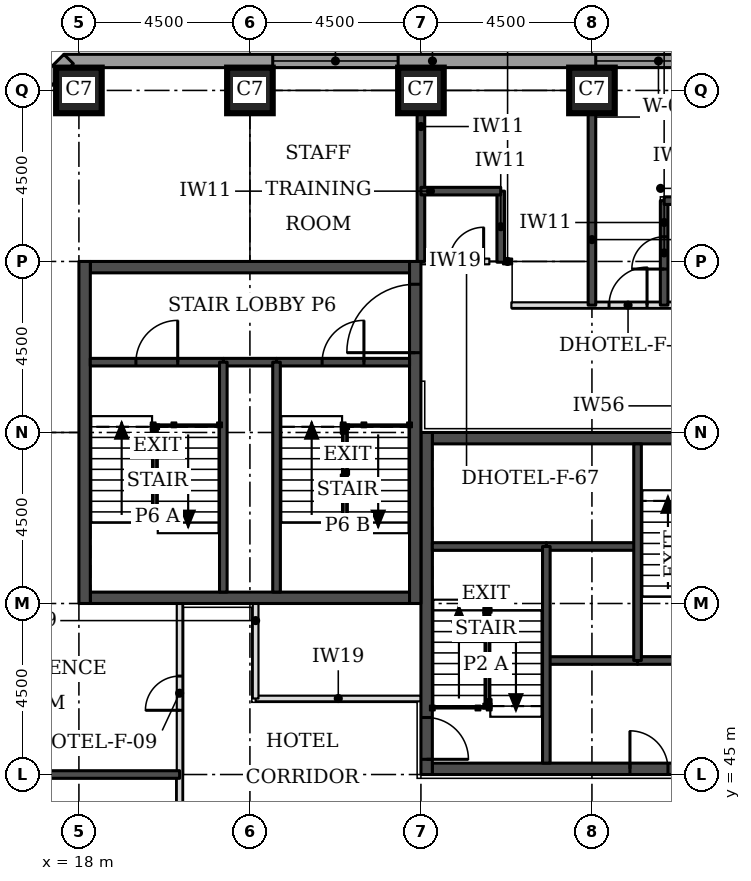
"""IFC4 building model, lengths in metres.
Left out: names, types, materials, properties, quantities, classifications, styles, units other than length and angle.
Written with IfcOpenShell. Run it as: python <this file> out.ifc"""

import sys

from ifc_helpers import new_model, si_unit, direction, frame, frame_2d, origin, origin_2d, place, context, subcontext, project, spatial, rectangle, extrude, element, fill, save


model = new_model("IFC4")
c1 = context("Model", 3, precision=1e-05, world=origin(), true_north=direction((0.0, 1.0)))
c2 = subcontext(c1, "Body", "Model", "MODEL_VIEW")
j1 = project(units=[si_unit("LENGTHUNIT", "METRE"), si_unit("PLANEANGLEUNIT", "RADIAN")], contexts=[c1])
p1 = place(None, origin())
s1 = spatial("IfcSite", under=j1, at=p1, CompositionType="ELEMENT")
p2 = place(p1, origin())
s2 = spatial("IfcBuilding", under=s1, at=p2, CompositionType="ELEMENT")
p3 = place(p2, frame((0.0, 0.0, 42.9)))
s3 = spatial("IfcBuildingStorey", under=s2, at=p3, CompositionType="ELEMENT", Elevation=42.9)
for number, where, z_axis, x_axis in (
    (1, (18.0, 63.0, 0.0), (0.0, 0.0, 1.0), (1.0, 0.0, 0.0)),
    (2, (22.5, 63.0, 0.0), (0.0, 0.0, 1.0), (1.0, 0.0, 0.0)),
    (3, (27.0, 63.0, 0.0), (0.0, 0.0, 1.0), (1.0, 0.0, 0.0)),
    (4, (31.5, 63.0, 0.0), (0.0, 0.0, 1.0), (1.0, 0.0, 0.0)),
):
    element("IfcColumn", number, at=place(p3, frame(where, z_axis=z_axis, x_axis=x_axis)), inside=s3, PredefinedType="COLUMN", context=c2, shape_type="SweptSolid", body=[
        extrude(rectangle(XDim=1.2, YDim=1.2, at=origin_2d()), origin(), (0.0, 0.0, 1.0), 3.3),
    ])
p4 = place(p3, frame((27.3, 45.15, 0.0), z_axis=(0.0, 0.0, 1.0), x_axis=(1.0, 0.0, 0.0)))
e5 = element("IfcWall", 5, at=p4, inside=s3, PredefinedType="SHEAR", context=c2, shape_type="SweptSolid", body=[
    extrude(rectangle(XDim=8.4, YDim=0.3, at=frame_2d((4.2, 0.0))), origin(), (0.0, 0.0, 1.0), 3.3),
])
p5 = place(p4, frame((5.2, 0.0, 0.0)))
e6 = element("IfcOpeningElement", 6, at=p5, cuts=e5, PredefinedType="OPENING", context=c2, shape_type="SweptSolid", body=[
    extrude(rectangle(XDim=1.0, YDim=2.1, at=frame_2d((0.5, 1.05))), frame((0.0, 0.16, 0.0), z_axis=(0.0, -1.0, 0.0), x_axis=(1.0, 0.0, 0.0)), (0.0, 0.0, 1.0), 0.32),
])
p6 = place(p3, frame((27.3, 53.85, 0.0), z_axis=(0.0, 0.0, 1.0), x_axis=(1.0, 0.0, 0.0)))
e7 = element("IfcWall", 7, at=p6, inside=s3, PredefinedType="SHEAR", context=c2, shape_type="SweptSolid", body=[
    extrude(rectangle(XDim=8.4, YDim=0.3, at=frame_2d((4.2, 0.0))), origin(), (0.0, 0.0, 1.0), 3.3),
])
p7 = place(p6, frame((6.4, 0.0, 0.0)))
e8 = element("IfcOpeningElement", 8, at=p7, cuts=e7, PredefinedType="OPENING", context=c2, shape_type="SweptSolid", body=[
    extrude(rectangle(XDim=1.1, YDim=2.1, at=frame_2d((0.55, 1.05))), frame((0.0, 0.16, 0.0), z_axis=(0.0, -1.0, 0.0), x_axis=(1.0, 0.0, 0.0)), (0.0, 0.0, 1.0), 0.32),
])
p8 = place(p3, frame((27.15, 45.0, 0.0), z_axis=(0.0, 0.0, 1.0), x_axis=(0.0, 1.0, 0.0)))
e9 = element("IfcWall", 9, at=p8, inside=s3, PredefinedType="SHEAR", context=c2, shape_type="SweptSolid", body=[
    extrude(rectangle(XDim=9.0, YDim=0.3, at=frame_2d((4.5, 0.0))), origin(), (0.0, 0.0, 1.0), 3.3),
])
p9 = place(p8, frame((0.4, 0.0, 0.0)))
e10 = element("IfcOpeningElement", 10, at=p9, cuts=e9, PredefinedType="OPENING", context=c2, shape_type="SweptSolid", body=[
    extrude(rectangle(XDim=1.1, YDim=2.1, at=frame_2d((0.55, 1.05))), frame((0.0, 0.16, 0.0), z_axis=(0.0, -1.0, 0.0), x_axis=(1.0, 0.0, 0.0)), (0.0, 0.0, 1.0), 0.32),
])
for number, where, z_axis, x_axis in (
    (11, (18.3, 49.65, 0.0), (0.0, 0.0, 1.0), (1.0, 0.0, 0.0)),
    (12, (18.3, 58.35, 0.0), (0.0, 0.0, 1.0), (1.0, 0.0, 0.0)),
):
    element("IfcWall", number, at=place(p3, frame(where, z_axis=z_axis, x_axis=x_axis)), inside=s3, PredefinedType="SHEAR", context=c2, shape_type="SweptSolid", body=[
        extrude(rectangle(XDim=8.4, YDim=0.3, at=frame_2d((4.2, 0.0))), origin(), (0.0, 0.0, 1.0), 3.3),
    ])
p10 = place(p3, frame((18.15, 49.5, 0.0), z_axis=(0.0, 0.0, 1.0), x_axis=(0.0, 1.0, 0.0)))
e13 = element("IfcWall", 13, at=p10, inside=s3, PredefinedType="SHEAR", context=c2, shape_type="SweptSolid", body=[
    extrude(rectangle(XDim=9.0, YDim=0.3, at=frame_2d((4.5, 0.0))), origin(), (0.0, 0.0, 1.0), 3.3),
])
p11 = place(p3, frame((26.85, 49.5, 0.0), z_axis=(0.0, 0.0, 1.0), x_axis=(0.0, 1.0, 0.0)))
e14 = element("IfcWall", 14, at=p11, inside=s3, PredefinedType="SHEAR", context=c2, shape_type="SweptSolid", body=[
    extrude(rectangle(XDim=9.0, YDim=0.3, at=frame_2d((4.5, 0.0))), origin(), (0.0, 0.0, 1.0), 3.3),
])
p12 = place(p11, frame((6.6, 0.0, 0.0)))
e15 = element("IfcOpeningElement", 15, at=p12, cuts=e14, PredefinedType="OPENING", context=c2, shape_type="SweptSolid", body=[
    extrude(rectangle(XDim=1.8, YDim=2.1, at=frame_2d((0.9, 1.05))), frame((0.0, 0.16, 0.0), z_axis=(0.0, -1.0, 0.0), x_axis=(1.0, 0.0, 0.0)), (0.0, 0.0, 1.0), 0.32),
])
p13 = place(p3, frame((35.4, 63.775, 0.0), z_axis=(0.0, 0.0, 1.0), x_axis=(-1.0, 0.0, 0.0)))
e16 = element("IfcWall", 16, at=p13, inside=s3, PredefinedType="STANDARD", context=c2, shape_type="SweptSolid", body=[
    extrude(rectangle(XDim=17.793, YDim=0.35, at=frame_2d((8.897, 0.0))), origin(), (0.0, 0.0, 1.0), 3.055),
])
p14 = place(p13, frame((0.5, 0.0, 0.8)))
e17 = element("IfcOpeningElement", 17, at=p14, cuts=e16, PredefinedType="OPENING", context=c2, shape_type="SweptSolid", body=[
    extrude(rectangle(XDim=3.3, YDim=1.5, at=frame_2d((1.65, 0.75))), frame((0.0, 0.185, 0.0), z_axis=(0.0, -1.0, 0.0), x_axis=(1.0, 0.0, 0.0)), (0.0, 0.0, 1.0), 0.37),
])
p15 = place(p13, frame((9.0, 0.0, 0.8)))
e18 = element("IfcOpeningElement", 18, at=p15, cuts=e16, PredefinedType="OPENING", context=c2, shape_type="SweptSolid", body=[
    extrude(rectangle(XDim=3.3, YDim=1.5, at=frame_2d((1.65, 0.75))), frame((0.0, 0.185, 0.0), z_axis=(0.0, -1.0, 0.0), x_axis=(1.0, 0.0, 0.0)), (0.0, 0.0, 1.0), 0.37),
])
p16 = place(p3, frame((17.73, 63.826, 0.0), z_axis=(0.0, 0.0, 1.0), x_axis=(-0.707106781187, -0.707106781187, 0.0)))
e19 = element("IfcWall", 19, at=p16, inside=s3, PredefinedType="STANDARD", context=c2, shape_type="SweptSolid", body=[
    extrude(rectangle(XDim=7.151, YDim=0.35, at=frame_2d((3.576, 0.0))), origin(), (0.0, 0.0, 1.0), 3.055),
])
p17 = place(p16, frame((1.926, 0.0, 0.8)))
e20 = element("IfcOpeningElement", 20, at=p17, cuts=e19, PredefinedType="OPENING", context=c2, shape_type="SweptSolid", body=[
    extrude(rectangle(XDim=3.3, YDim=1.5, at=frame_2d((1.65, 0.75))), frame((0.0, 0.185, 0.0), z_axis=(0.0, -1.0, 0.0), x_axis=(1.0, 0.0, 0.0)), (0.0, 0.0, 1.0), 0.37),
])
p18 = place(p3, frame((20.65, 23.65, 0.0), z_axis=(0.0, 0.0, 1.0), x_axis=(0.0, 1.0, 0.0)))
e21 = element("IfcWall", 21, at=p18, inside=s3, PredefinedType="PARTITIONING", context=c2, shape_type="SweptSolid", body=[
    extrude(rectangle(XDim=25.85, YDim=0.15, at=frame_2d((12.925, 0.0))), origin(), (0.0, 0.0, 1.0), 3.08),
])
p19 = place(p18, frame((1.9, 0.0, 0.0)))
e22 = element("IfcOpeningElement", 22, at=p19, cuts=e21, PredefinedType="OPENING", context=c2, shape_type="SweptSolid", body=[
    extrude(rectangle(XDim=1.0, YDim=2.1, at=frame_2d((0.5, 1.05))), frame((0.0, 0.085, 0.0), z_axis=(0.0, -1.0, 0.0), x_axis=(1.0, 0.0, 0.0)), (0.0, 0.0, 1.0), 0.17),
])
p20 = place(p18, frame((6.0, 0.0, 0.0)))
e23 = element("IfcOpeningElement", 23, at=p20, cuts=e21, PredefinedType="OPENING", context=c2, shape_type="SweptSolid", body=[
    extrude(rectangle(XDim=1.0, YDim=2.1, at=frame_2d((0.5, 1.05))), frame((0.0, 0.085, 0.0), z_axis=(0.0, -1.0, 0.0), x_axis=(1.0, 0.0, 0.0)), (0.0, 0.0, 1.0), 0.17),
])
p21 = place(p18, frame((17.95, 0.0, 0.0)))
e24 = element("IfcOpeningElement", 24, at=p21, cuts=e21, PredefinedType="OPENING", context=c2, shape_type="SweptSolid", body=[
    extrude(rectangle(XDim=1.0, YDim=2.1, at=frame_2d((0.5, 1.05))), frame((0.0, 0.085, 0.0), z_axis=(0.0, -1.0, 0.0), x_axis=(1.0, 0.0, 0.0)), (0.0, 0.0, 1.0), 0.17),
])
p22 = place(p18, frame((23.04, 0.0, 0.0)))
e25 = element("IfcOpeningElement", 25, at=p22, cuts=e21, PredefinedType="OPENING", context=c2, shape_type="SweptSolid", body=[
    extrude(rectangle(XDim=0.9, YDim=2.1, at=frame_2d((0.45, 1.05))), frame((0.0, 0.085, 0.0), z_axis=(0.0, -1.0, 0.0), x_axis=(1.0, 0.0, 0.0)), (0.0, 0.0, 1.0), 0.17),
])
p23 = place(p3, frame((22.65, 47.0, 0.0), z_axis=(0.0, 0.0, 1.0), x_axis=(1.0, 0.0, 0.0)))
e26 = element("IfcWall", 26, at=p23, inside=s3, PredefinedType="PARTITIONING", context=c2, shape_type="SweptSolid", body=[
    extrude(rectangle(XDim=4.35, YDim=0.15, at=frame_2d((2.175, 0.0))), origin(), (0.0, 0.0, 1.0), 3.08),
])
p24 = place(p3, frame((22.65, 47.0, 0.0), z_axis=(0.0, 0.0, 1.0), x_axis=(0.0, 1.0, 0.0)))
e27 = element("IfcWall", 27, at=p24, inside=s3, PredefinedType="PARTITIONING", context=c2, shape_type="SweptSolid", body=[
    extrude(rectangle(XDim=2.5, YDim=0.15, at=frame_2d((1.25, 0.0))), origin(), (0.0, 0.0, 1.0), 3.08),
])
p25 = place(p3, frame((29.38, 57.35, 0.0), z_axis=(0.0, 0.0, 1.0), x_axis=(1.0, 0.0, 0.0)))
e28 = element("IfcWall", 28, at=p25, inside=s3, PredefinedType="PARTITIONING", context=c2, shape_type="SweptSolid", body=[
    extrude(rectangle(XDim=13.62, YDim=0.15, at=frame_2d((6.81, 0.0))), origin(), (0.0, 0.0, 1.0), 3.08),
])
p26 = place(p25, frame((2.57, 0.0, 0.0)))
e29 = element("IfcOpeningElement", 29, at=p26, cuts=e28, PredefinedType="OPENING", context=c2, shape_type="SweptSolid", body=[
    extrude(rectangle(XDim=1.0, YDim=2.1, at=frame_2d((0.5, 1.05))), frame((0.0, 0.085, 0.0), z_axis=(0.0, -1.0, 0.0), x_axis=(1.0, 0.0, 0.0)), (0.0, 0.0, 1.0), 0.17),
])
p27 = place(p25, frame((8.42, 0.0, 0.0)))
e30 = element("IfcOpeningElement", 30, at=p27, cuts=e28, PredefinedType="OPENING", context=c2, shape_type="SweptSolid", body=[
    extrude(rectangle(XDim=0.9, YDim=2.1, at=frame_2d((0.45, 1.05))), frame((0.0, 0.085, 0.0), z_axis=(0.0, -1.0, 0.0), x_axis=(1.0, 0.0, 0.0)), (0.0, 0.0, 1.0), 0.17),
])
p28 = place(p3, frame((14.1, 45.0, 0.0), z_axis=(0.0, 0.0, 1.0), x_axis=(1.0, 0.0, 0.0)))
e31 = element("IfcWall", 31, at=p28, inside=s3, PredefinedType="SOLIDWALL", context=c2, shape_type="SweptSolid", body=[
    extrude(rectangle(XDim=6.55, YDim=0.2, at=frame_2d((3.275, 0.0))), origin(), (0.0, 0.0, 1.0), 3.08),
])
p29 = place(p3, frame((27.0, 58.5, 0.0), z_axis=(0.0, 0.0, 1.0), x_axis=(0.0, 1.0, 0.0)))
e32 = element("IfcWall", 32, at=p29, inside=s3, PredefinedType="SOLIDWALL", context=c2, shape_type="SweptSolid", body=[
    extrude(rectangle(XDim=3.9, YDim=0.2, at=frame_2d((1.95, 0.0))), origin(), (0.0, 0.0, 1.0), 3.08),
])
p30 = place(p3, frame((29.1, 58.48, 0.0), z_axis=(0.0, 0.0, 1.0), x_axis=(0.0, 1.0, 0.0)))
e33 = element("IfcWall", 33, at=p30, inside=s3, PredefinedType="SOLIDWALL", context=c2, shape_type="SweptSolid", body=[
    extrude(rectangle(XDim=1.87, YDim=0.2, at=frame_2d((0.935, 0.0))), origin(), (0.0, 0.0, 1.0), 3.08),
])
p31 = place(p3, frame((31.5, 57.35, 0.0), z_axis=(0.0, 0.0, 1.0), x_axis=(0.0, 1.0, 0.0)))
e34 = element("IfcWall", 34, at=p31, inside=s3, PredefinedType="SOLIDWALL", context=c2, shape_type="SweptSolid", body=[
    extrude(rectangle(XDim=5.05, YDim=0.2, at=frame_2d((2.525, 0.0))), origin(), (0.0, 0.0, 1.0), 3.08),
])
p32 = place(p3, frame((33.4, 57.35, 0.0), z_axis=(0.0, 0.0, 1.0), x_axis=(0.0, 1.0, 0.0)))
e35 = element("IfcWall", 35, at=p32, inside=s3, PredefinedType="SOLIDWALL", context=c2, shape_type="SweptSolid", body=[
    extrude(rectangle(XDim=2.75, YDim=0.2, at=frame_2d((1.375, 0.0))), origin(), (0.0, 0.0, 1.0), 3.08),
])
p33 = place(p32, frame((0.95, 0.0, 0.0)))
e36 = element("IfcOpeningElement", 36, at=p33, cuts=e35, PredefinedType="OPENING", context=c2, shape_type="SweptSolid", body=[
    extrude(rectangle(XDim=0.85, YDim=2.1, at=frame_2d((0.425, 1.05))), frame((0.0, 0.11, 0.0), z_axis=(0.0, -1.0, 0.0), x_axis=(1.0, 0.0, 0.0)), (0.0, 0.0, 1.0), 0.22),
])
p34 = place(p3, frame((33.4, 60.1, 0.0), z_axis=(0.0, 0.0, 1.0), x_axis=(1.0, 0.0, 0.0)))
e37 = element("IfcWall", 37, at=p34, inside=s3, PredefinedType="SOLIDWALL", context=c2, shape_type="SweptSolid", body=[
    extrude(rectangle(XDim=2.6, YDim=0.2, at=frame_2d((1.3, 0.0))), origin(), (0.0, 0.0, 1.0), 3.08),
])
p35 = place(p3, frame((27.0, 60.35, 0.0), z_axis=(0.0, 0.0, 1.0), x_axis=(1.0, 0.0, 0.0)))
e38 = element("IfcWall", 38, at=p35, inside=s3, PredefinedType="SOLIDWALL", context=c2, shape_type="SweptSolid", body=[
    extrude(rectangle(XDim=2.1, YDim=0.2, at=frame_2d((1.05, 0.0))), origin(), (0.0, 0.0, 1.0), 3.08),
])
p36 = place(p3, frame((27.0, 58.5, 0.0), z_axis=(0.0, 0.0, 1.0), x_axis=(1.0, 0.0, 0.0)))
e39 = element("IfcWall", 39, at=p36, inside=s3, PredefinedType="PARTITIONING", context=c2, shape_type="SweptSolid", body=[
    extrude(rectangle(XDim=1.8, YDim=0.15, at=frame_2d((0.9, 0.0))), origin(), (0.0, 0.0, 1.0), 3.08),
])
p37 = place(p36, frame((0.75, 0.0, 0.0)))
e40 = element("IfcOpeningElement", 40, at=p37, cuts=e39, PredefinedType="OPENING", context=c2, shape_type="SweptSolid", body=[
    extrude(rectangle(XDim=0.9, YDim=2.1, at=frame_2d((0.45, 1.05))), frame((0.0, 0.085, 0.0), z_axis=(0.0, -1.0, 0.0), x_axis=(1.0, 0.0, 0.0)), (0.0, 0.0, 1.0), 0.17),
])
p38 = place(p3, frame((29.16, 58.5, 0.0), z_axis=(0.0, 0.0, 1.0), x_axis=(1.0, 0.0, 0.0)))
e41 = element("IfcWall", 41, at=p38, inside=s3, PredefinedType="PARTITIONING", context=c2, shape_type="SweptSolid", body=[
    extrude(rectangle(XDim=0.24, YDim=0.15, at=frame_2d((0.12, 0.0))), origin(), (0.0, 0.0, 1.0), 3.08),
])
p39 = place(p3, frame((30.3, 48.0, 0.0), z_axis=(0.0, 0.0, 1.0), x_axis=(1.0, 0.0, 0.0)))
e42 = element("IfcWall", 42, at=p39, inside=s3, PredefinedType="SOLIDWALL", context=c2, shape_type="SweptSolid", body=[
    extrude(rectangle(XDim=2.4, YDim=0.2, at=frame_2d((1.2, 0.0))), origin(), (0.0, 0.0, 1.0), 3.08),
])
p40 = place(p3, frame((32.7, 48.0, 0.0), z_axis=(0.0, 0.0, 1.0), x_axis=(1.0, 0.0, 0.0)))
e43 = element("IfcWall", 43, at=p40, inside=s3, PredefinedType="SOLIDWALL", context=c2, shape_type="SweptSolid", body=[
    extrude(rectangle(XDim=3.0, YDim=0.2, at=frame_2d((1.5, 0.0))), origin(), (0.0, 0.0, 1.0), 3.08),
])
p41 = place(p3, frame((30.3, 51.0, 0.0), z_axis=(0.0, 0.0, 1.0), x_axis=(1.0, 0.0, 0.0)))
e44 = element("IfcWall", 44, at=p41, inside=s3, PredefinedType="SOLIDWALL", context=c2, shape_type="SweptSolid", body=[
    extrude(rectangle(XDim=2.4, YDim=0.2, at=frame_2d((1.2, 0.0))), origin(), (0.0, 0.0, 1.0), 3.3),
])
p42 = place(p3, frame((27.3, 51.0, 0.0), z_axis=(0.0, 0.0, 1.0), x_axis=(1.0, 0.0, 0.0)))
e45 = element("IfcWall", 45, at=p42, inside=s3, PredefinedType="SOLIDWALL", context=c2, shape_type="SweptSolid", body=[
    extrude(rectangle(XDim=3.0, YDim=0.2, at=frame_2d((1.5, 0.0))), origin(), (0.0, 0.0, 1.0), 3.08),
])
for number, where, z_axis, x_axis in (
    (46, (30.3, 45.3, 0.0), (0.0, 0.0, 1.0), (0.0, 1.0, 0.0)),
    (47, (32.7, 48.0, 0.0), (0.0, 0.0, 1.0), (0.0, 1.0, 0.0)),
):
    element("IfcWall", number, at=place(p3, frame(where, z_axis=z_axis, x_axis=x_axis)), inside=s3, PredefinedType="SOLIDWALL", context=c2, shape_type="SweptSolid", body=[
        extrude(rectangle(XDim=5.7, YDim=0.2, at=frame_2d((2.85, 0.0))), origin(), (0.0, 0.0, 1.0), 3.08),
    ])
p43 = place(p3, frame((21.8, 55.85, 0.0), z_axis=(0.0, 0.0, 1.0), x_axis=(1.0, 0.0, 0.0)))
e48 = element("IfcWall", 48, at=p43, inside=s3, PredefinedType="SOLIDWALL", context=c2, shape_type="SweptSolid", body=[
    extrude(rectangle(XDim=1.4, YDim=0.2, at=frame_2d((0.7, 0.0))), origin(), (0.0, 0.0, 1.0), 3.08),
])
p44 = place(p3, frame((18.3, 55.85, 0.0), z_axis=(0.0, 0.0, 1.0), x_axis=(1.0, 0.0, 0.0)))
e49 = element("IfcWall", 49, at=p44, inside=s3, PredefinedType="SOLIDWALL", context=c2, shape_type="SweptSolid", body=[
    extrude(rectangle(XDim=3.5, YDim=0.2, at=frame_2d((1.75, 0.0))), origin(), (0.0, 0.0, 1.0), 3.08),
])
p45 = place(p44, frame((1.2, 0.0, 0.0)))
e50 = element("IfcOpeningElement", 50, at=p45, cuts=e49, PredefinedType="OPENING", context=c2, shape_type="SweptSolid", body=[
    extrude(rectangle(XDim=1.1, YDim=2.1, at=frame_2d((0.55, 1.05))), frame((0.0, 0.11, 0.0), z_axis=(0.0, -1.0, 0.0), x_axis=(1.0, 0.0, 0.0)), (0.0, 0.0, 1.0), 0.22),
])
p46 = place(p3, frame((23.2, 55.85, 0.0), z_axis=(0.0, 0.0, 1.0), x_axis=(1.0, 0.0, 0.0)))
e51 = element("IfcWall", 51, at=p46, inside=s3, PredefinedType="SOLIDWALL", context=c2, shape_type="SweptSolid", body=[
    extrude(rectangle(XDim=3.5, YDim=0.2, at=frame_2d((1.75, 0.0))), origin(), (0.0, 0.0, 1.0), 3.08),
])
p47 = place(p46, frame((1.2, 0.0, 0.0)))
e52 = element("IfcOpeningElement", 52, at=p47, cuts=e51, PredefinedType="OPENING", context=c2, shape_type="SweptSolid", body=[
    extrude(rectangle(XDim=1.1, YDim=2.1, at=frame_2d((0.55, 1.05))), frame((0.0, 0.11, 0.0), z_axis=(0.0, -1.0, 0.0), x_axis=(1.0, 0.0, 0.0)), (0.0, 0.0, 1.0), 0.22),
])
for number, where, z_axis, x_axis in (
    (53, (21.8, 49.8, 0.0), (0.0, 0.0, 1.0), (0.0, 1.0, 0.0)),
    (54, (23.2, 49.8, 0.0), (0.0, 0.0, 1.0), (0.0, 1.0, 0.0)),
):
    element("IfcWall", number, at=place(p3, frame(where, z_axis=z_axis, x_axis=x_axis)), inside=s3, PredefinedType="SOLIDWALL", context=c2, shape_type="SweptSolid", body=[
        extrude(rectangle(XDim=6.05, YDim=0.2, at=frame_2d((3.025, 0.0))), origin(), (0.0, 0.0, 1.0), 3.08),
    ])
p48 = place(p14, origin())
e55 = element("IfcWindow", 55, at=p48, inside=s3, PartitioningType="SINGLE_PANEL", PredefinedType="WINDOW", context=c2, shape_type="SweptSolid", body=[
    extrude(rectangle(XDim=3.3, YDim=1.5, at=frame_2d((1.65, 0.75))), frame((0.0, 0.085, 0.0), z_axis=(0.0, -1.0, 0.0), x_axis=(1.0, 0.0, 0.0)), (0.0, 0.0, 1.0), 0.06),
])
fill(e17, e55)
p49 = place(p15, origin())
e56 = element("IfcWindow", 56, at=p49, inside=s3, PartitioningType="SINGLE_PANEL", PredefinedType="WINDOW", context=c2, shape_type="SweptSolid", body=[
    extrude(rectangle(XDim=3.3, YDim=1.5, at=frame_2d((1.65, 0.75))), frame((0.0, 0.085, 0.0), z_axis=(0.0, -1.0, 0.0), x_axis=(1.0, 0.0, 0.0)), (0.0, 0.0, 1.0), 0.06),
])
fill(e18, e56)
p50 = place(p26, origin())
e57 = element("IfcDoor", 57, at=p50, inside=s3, OperationType="SINGLE_SWING_RIGHT", PredefinedType="DOOR", context=c2, shape_type="SweptSolid", body=[
    extrude(rectangle(XDim=1.0, YDim=2.1, at=frame_2d((0.5, 1.05))), frame((0.0, 0.025, 0.0), z_axis=(0.0, -1.0, 0.0), x_axis=(1.0, 0.0, 0.0)), (0.0, 0.0, 1.0), 0.05),
])
fill(e29, e57)
p51 = place(p33, origin())
e58 = element("IfcDoor", 58, at=p51, inside=s3, OperationType="SINGLE_SWING_LEFT", PredefinedType="DOOR", context=c2, shape_type="SweptSolid", body=[
    extrude(rectangle(XDim=0.85, YDim=2.1, at=frame_2d((0.425, 1.05))), frame((0.0, 0.025, 0.0), z_axis=(0.0, -1.0, 0.0), x_axis=(1.0, 0.0, 0.0)), (0.0, 0.0, 1.0), 0.05),
])
fill(e36, e58)
p52 = place(p22, origin())
e59 = element("IfcDoor", 59, at=p52, inside=s3, OperationType="SINGLE_SWING_LEFT", PredefinedType="DOOR", context=c2, shape_type="SweptSolid", body=[
    extrude(rectangle(XDim=0.9, YDim=2.1, at=frame_2d((0.45, 1.05))), frame((0.0, 0.025, 0.0), z_axis=(0.0, -1.0, 0.0), x_axis=(1.0, 0.0, 0.0)), (0.0, 0.0, 1.0), 0.05),
])
fill(e25, e59)
p53 = place(p37, origin())
e60 = element("IfcDoor", 60, at=p53, inside=s3, OperationType="SINGLE_SWING_RIGHT", PredefinedType="DOOR", context=c2, shape_type="SweptSolid", body=[
    extrude(rectangle(XDim=0.9, YDim=2.1, at=frame_2d((0.45, 1.05))), frame((0.0, 0.025, 0.0), z_axis=(0.0, -1.0, 0.0), x_axis=(1.0, 0.0, 0.0)), (0.0, 0.0, 1.0), 0.05),
])
fill(e40, e60)
p54 = place(p9, frame((1.1, 0.0, 0.0), z_axis=(0.0, 0.0, 1.0), x_axis=(-1.0, 0.0, 0.0)))
e61 = element("IfcDoor", 61, at=p54, inside=s3, OperationType="SINGLE_SWING_RIGHT", PredefinedType="DOOR", context=c2, shape_type="SweptSolid", body=[
    extrude(rectangle(XDim=1.1, YDim=2.1, at=frame_2d((0.55, 1.05))), frame((0.0, 0.025, 0.0), z_axis=(0.0, -1.0, 0.0), x_axis=(1.0, 0.0, 0.0)), (0.0, 0.0, 1.0), 0.05),
])
fill(e10, e61)
p55 = place(p5, origin())
e62 = element("IfcDoor", 62, at=p55, inside=s3, OperationType="SINGLE_SWING_LEFT", PredefinedType="DOOR", context=c2, shape_type="SweptSolid", body=[
    extrude(rectangle(XDim=1.0, YDim=2.1, at=frame_2d((0.5, 1.05))), frame((0.0, 0.025, 0.0), z_axis=(0.0, -1.0, 0.0), x_axis=(1.0, 0.0, 0.0)), (0.0, 0.0, 1.0), 0.05),
])
fill(e6, e62)
p56 = place(p45, origin())
e63 = element("IfcDoor", 63, at=p56, inside=s3, OperationType="SINGLE_SWING_RIGHT", PredefinedType="DOOR", context=c2, shape_type="SweptSolid", body=[
    extrude(rectangle(XDim=1.1, YDim=2.1, at=frame_2d((0.55, 1.05))), frame((0.0, 0.025, 0.0), z_axis=(0.0, -1.0, 0.0), x_axis=(1.0, 0.0, 0.0)), (0.0, 0.0, 1.0), 0.05),
])
fill(e50, e63)
p57 = place(p47, origin())
e64 = element("IfcDoor", 64, at=p57, inside=s3, OperationType="SINGLE_SWING_RIGHT", PredefinedType="DOOR", context=c2, shape_type="SweptSolid", body=[
    extrude(rectangle(XDim=1.1, YDim=2.1, at=frame_2d((0.55, 1.05))), frame((0.0, 0.025, 0.0), z_axis=(0.0, -1.0, 0.0), x_axis=(1.0, 0.0, 0.0)), (0.0, 0.0, 1.0), 0.05),
])
fill(e52, e64)
p58 = place(p12, origin())
e65 = element("IfcDoor", 65, at=p58, inside=s3, OperationType="SINGLE_SWING_LEFT", PredefinedType="DOOR", context=c2, shape_type="SweptSolid", body=[
    extrude(rectangle(XDim=1.8, YDim=2.1, at=frame_2d((0.9, 1.05))), frame((0.0, 0.025, 0.0), z_axis=(0.0, -1.0, 0.0), x_axis=(1.0, 0.0, 0.0)), (0.0, 0.0, 1.0), 0.05),
])
fill(e15, e65)
save(model, sys.argv[1])
